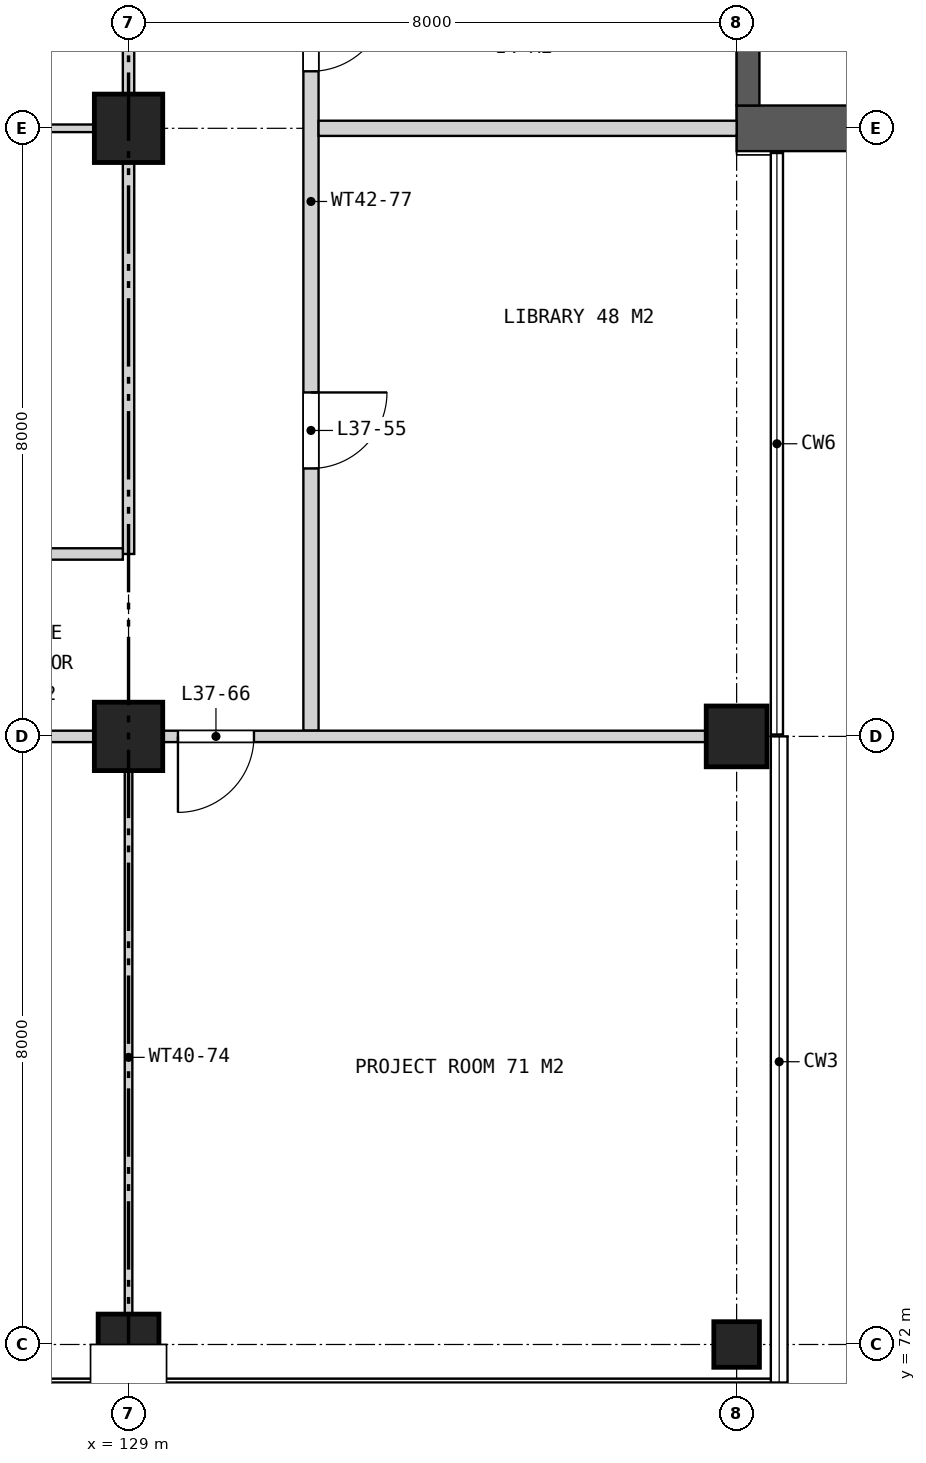
"""IFC4 building model, lengths in metres.
Left out: names, types, materials, properties, quantities, classifications, styles, units other than length and angle.
Written with IfcOpenShell. Run it as: python <this file> out.ifc"""

import sys

from ifc_helpers import new_model, si_unit, direction, frame, frame_2d, origin, origin_2d, place, context, subcontext, project, spatial, rectangle, extrude, element, fill, save


model = new_model("IFC4")
c1 = context("Model", 3, precision=1e-05, world=origin(), true_north=direction((0.0, 1.0)))
c2 = subcontext(c1, "Body", "Model", "MODEL_VIEW")
j1 = project(units=[si_unit("LENGTHUNIT", "METRE"), si_unit("PLANEANGLEUNIT", "RADIAN")], contexts=[c1])
p1 = place(None, origin())
s1 = spatial("IfcSite", under=j1, at=p1, CompositionType="ELEMENT")
p2 = place(p1, origin())
s2 = spatial("IfcBuilding", under=s1, at=p2, CompositionType="ELEMENT")
p3 = place(p2, frame((0.0, 0.0, 178.9)))
s3 = spatial("IfcBuildingStorey", under=s2, at=p3, CompositionType="ELEMENT", Elevation=178.9)
p4 = place(p3, frame((129.0, 72.0, 0.0), z_axis=(0.0, 0.0, 1.0), x_axis=(1.0, 0.0, 0.0)))
e1 = element("IfcColumn", 1, at=p4, inside=s3, PredefinedType="COLUMN", context=c2, shape_type="SweptSolid", body=[
    extrude(rectangle(XDim=0.8, YDim=0.8, at=origin_2d()), origin(), (0.0, 0.0, 1.0), 4.2),
])
for number, where, z_axis, x_axis in (
    (2, (129.0, 80.0, 0.0), (0.0, 0.0, 1.0), (1.0, 0.0, 0.0)),
    (3, (129.0, 88.0, 0.0), (0.0, 0.0, 1.0), (1.0, 0.0, 0.0)),
):
    element("IfcColumn", number, at=place(p3, frame(where, z_axis=z_axis, x_axis=x_axis)), inside=s3, PredefinedType="COLUMN", context=c2, shape_type="SweptSolid", body=[
        extrude(rectangle(XDim=0.9, YDim=0.9, at=origin_2d()), origin(), (0.0, 0.0, 1.0), 4.2),
    ])
p5 = place(p3, frame((137.0, 72.0, 0.0), z_axis=(0.0, 0.0, 1.0), x_axis=(1.0, 0.0, 0.0)))
e4 = element("IfcColumn", 4, at=p5, inside=s3, PredefinedType="COLUMN", context=c2, shape_type="SweptSolid", body=[
    extrude(rectangle(XDim=0.6, YDim=0.6, at=origin_2d()), origin(), (0.0, 0.0, 1.0), 4.2),
])
p6 = place(p3, frame((137.0, 80.0, 0.0), z_axis=(0.0, 0.0, 1.0), x_axis=(1.0, 0.0, 0.0)))
e5 = element("IfcColumn", 5, at=p6, inside=s3, PredefinedType="COLUMN", context=c2, shape_type="SweptSolid", body=[
    extrude(rectangle(XDim=0.8, YDim=0.8, at=origin_2d()), origin(), (0.0, 0.0, 1.0), 4.2),
])
p7 = place(p3, frame((137.0, 88.0, 0.0), z_axis=(0.0, 0.0, 1.0), x_axis=(1.0, 0.0, 0.0)))
e6 = element("IfcWall", 6, at=p7, inside=s3, PredefinedType="SHEAR", context=c2, shape_type="SweptSolid", body=[
    extrude(rectangle(XDim=7.1, YDim=0.6, at=frame_2d((3.55, 0.0))), origin(), (0.0, 0.0, 1.0), 4.2),
])
p8 = place(p3, frame((137.15, 88.3, 0.0), z_axis=(0.0, 0.0, 1.0), x_axis=(0.0, 1.0, 0.0)))
e7 = element("IfcWall", 7, at=p8, inside=s3, PredefinedType="SHEAR", context=c2, shape_type="SweptSolid", body=[
    extrude(rectangle(XDim=6.0, YDim=0.3, at=frame_2d((3.0, 0.0))), origin(), (0.0, 0.0, 1.0), 4.2),
])
p9 = place(p3, frame((129.0, 71.63, 0.0), z_axis=(0.0, 0.0, 1.0), x_axis=(0.0, 1.0, 0.0)))
e8 = element("IfcWall", 8, at=p9, inside=s3, PredefinedType="PARTITIONING", context=c2, shape_type="SweptSolid", body=[
    extrude(rectangle(XDim=8.295, YDim=0.1, at=frame_2d((4.147, 0.0))), origin(), (0.0, 0.0, 1.0), 3.44),
])
p10 = place(p3, frame((129.0, 82.4, 0.0), z_axis=(0.0, 0.0, 1.0), x_axis=(0.0, 1.0, 0.0)))
e9 = element("IfcWall", 9, at=p10, inside=s3, PredefinedType="PARTITIONING", context=c2, shape_type="SweptSolid", body=[
    extrude(rectangle(XDim=35.2, YDim=0.15, at=frame_2d((17.6, 0.0))), origin(), (0.0, 0.0, 1.0), 3.44),
])
p11 = place(p10, frame((14.35, 0.0, 0.0)))
e10 = element("IfcOpeningElement", 10, at=p11, cuts=e9, PredefinedType="OPENING", context=c2, shape_type="SweptSolid", body=[
    extrude(rectangle(XDim=1.0, YDim=2.1, at=frame_2d((0.5, 1.05))), frame((0.0, 0.085, 0.0), z_axis=(0.0, -1.0, 0.0), x_axis=(1.0, 0.0, 0.0)), (0.0, 0.0, 1.0), 0.17),
])
p12 = place(p10, frame((23.45, 0.0, 0.0)))
e11 = element("IfcOpeningElement", 11, at=p12, cuts=e9, PredefinedType="OPENING", context=c2, shape_type="SweptSolid", body=[
    extrude(rectangle(XDim=1.0, YDim=2.1, at=frame_2d((0.5, 1.05))), frame((0.0, 0.085, 0.0), z_axis=(0.0, -1.0, 0.0), x_axis=(1.0, 0.0, 0.0)), (0.0, 0.0, 1.0), 0.17),
])
p13 = place(p3, frame((131.4, 80.075, 0.0), z_axis=(0.0, 0.0, 1.0), x_axis=(0.0, 1.0, 0.0)))
e12 = element("IfcWall", 12, at=p13, inside=s3, PredefinedType="SOLIDWALL", context=c2, shape_type="SweptSolid", body=[
    extrude(rectangle(XDim=13.925, YDim=0.2, at=frame_2d((6.962, 0.0))), origin(), (0.0, 0.0, 1.0), 3.44),
])
p14 = place(p13, frame((11.675, 0.0, 0.0)))
e13 = element("IfcOpeningElement", 13, at=p14, cuts=e12, PredefinedType="OPENING", context=c2, shape_type="SweptSolid", body=[
    extrude(rectangle(XDim=1.0, YDim=2.1, at=frame_2d((0.5, 1.05))), frame((0.0, 0.11, 0.0), z_axis=(0.0, -1.0, 0.0), x_axis=(1.0, 0.0, 0.0)), (0.0, 0.0, 1.0), 0.22),
])
p15 = place(p13, frame((8.675, 0.0, 0.0)))
e14 = element("IfcOpeningElement", 14, at=p15, cuts=e12, PredefinedType="OPENING", context=c2, shape_type="SweptSolid", body=[
    extrude(rectangle(XDim=1.0, YDim=2.1, at=frame_2d((0.5, 1.05))), frame((0.0, 0.11, 0.0), z_axis=(0.0, -1.0, 0.0), x_axis=(1.0, 0.0, 0.0)), (0.0, 0.0, 1.0), 0.22),
])
p16 = place(p13, frame((3.45, 0.0, 0.0)))
e15 = element("IfcOpeningElement", 15, at=p16, cuts=e12, PredefinedType="OPENING", context=c2, shape_type="SweptSolid", body=[
    extrude(rectangle(XDim=1.0, YDim=2.1, at=frame_2d((0.5, 1.05))), frame((0.0, 0.11, 0.0), z_axis=(0.0, -1.0, 0.0), x_axis=(1.0, 0.0, 0.0)), (0.0, 0.0, 1.0), 0.22),
])
p17 = place(p3, frame((112.63, 80.0, 0.0), z_axis=(0.0, 0.0, 1.0), x_axis=(1.0, 0.0, 0.0)))
e16 = element("IfcWall", 16, at=p17, inside=s3, PredefinedType="PARTITIONING", context=c2, shape_type="SweptSolid", body=[
    extrude(rectangle(XDim=24.74, YDim=0.15, at=frame_2d((12.37, 0.0))), origin(), (0.0, 0.0, 1.0), 3.44),
])
p18 = place(p17, frame((11.42, 0.0, 0.0)))
e17 = element("IfcOpeningElement", 17, at=p18, cuts=e16, PredefinedType="OPENING", context=c2, shape_type="SweptSolid", body=[
    extrude(rectangle(XDim=1.8, YDim=2.1, at=frame_2d((0.9, 1.05))), frame((0.0, 0.085, 0.0), z_axis=(0.0, -1.0, 0.0), x_axis=(1.0, 0.0, 0.0)), (0.0, 0.0, 1.0), 0.17),
])
p19 = place(p17, frame((17.02, 0.0, 0.0)))
e18 = element("IfcOpeningElement", 18, at=p19, cuts=e16, PredefinedType="OPENING", context=c2, shape_type="SweptSolid", body=[
    extrude(rectangle(XDim=1.0, YDim=2.1, at=frame_2d((0.5, 1.05))), frame((0.0, 0.085, 0.0), z_axis=(0.0, -1.0, 0.0), x_axis=(1.0, 0.0, 0.0)), (0.0, 0.0, 1.0), 0.17),
])
p20 = place(p3, frame((121.075, 82.4, 0.0), z_axis=(0.0, 0.0, 1.0), x_axis=(1.0, 0.0, 0.0)))
e19 = element("IfcWall", 19, at=p20, inside=s3, PredefinedType="PARTITIONING", context=c2, shape_type="SweptSolid", body=[
    extrude(rectangle(XDim=7.85, YDim=0.15, at=frame_2d((3.925, 0.0))), origin(), (0.0, 0.0, 1.0), 3.44),
])
p21 = place(p20, frame((1.45, 0.0, 0.0)))
e20 = element("IfcOpeningElement", 20, at=p21, cuts=e19, PredefinedType="OPENING", context=c2, shape_type="SweptSolid", body=[
    extrude(rectangle(XDim=1.0, YDim=2.1, at=frame_2d((0.5, 1.05))), frame((0.0, 0.085, 0.0), z_axis=(0.0, -1.0, 0.0), x_axis=(1.0, 0.0, 0.0)), (0.0, 0.0, 1.0), 0.17),
])
p22 = place(p20, frame((5.375, 0.0, 0.0)))
e21 = element("IfcOpeningElement", 21, at=p22, cuts=e19, PredefinedType="OPENING", context=c2, shape_type="SweptSolid", body=[
    extrude(rectangle(XDim=1.0, YDim=2.1, at=frame_2d((0.5, 1.05))), frame((0.0, 0.085, 0.0), z_axis=(0.0, -1.0, 0.0), x_axis=(1.0, 0.0, 0.0)), (0.0, 0.0, 1.0), 0.17),
])
p23 = place(p3, frame((121.075, 88.0, 0.0), z_axis=(0.0, 0.0, 1.0), x_axis=(1.0, 0.0, 0.0)))
e22 = element("IfcWall", 22, at=p23, inside=s3, PredefinedType="PARTITIONING", context=c2, shape_type="SweptSolid", body=[
    extrude(rectangle(XDim=7.85, YDim=0.1, at=frame_2d((3.925, 0.0))), origin(), (0.0, 0.0, 1.0), 3.44),
])
p24 = place(p3, frame((131.5, 88.0, 0.0), z_axis=(0.0, 0.0, 1.0), x_axis=(1.0, 0.0, 0.0)))
e23 = element("IfcWall", 23, at=p24, inside=s3, PredefinedType="SOLIDWALL", context=c2, shape_type="SweptSolid", body=[
    extrude(rectangle(XDim=5.5, YDim=0.2, at=frame_2d((2.75, 0.0))), origin(), (0.0, 0.0, 1.0), 3.44),
])
p25 = place(p15, frame((1.0, 0.0, 0.0), z_axis=(0.0, 0.0, 1.0), x_axis=(-1.0, 0.0, 0.0)))
e24 = element("IfcDoor", 24, at=p25, inside=s3, OperationType="SINGLE_SWING_LEFT", PredefinedType="DOOR", context=c2, shape_type="SweptSolid", body=[
    extrude(rectangle(XDim=1.0, YDim=2.1, at=frame_2d((0.5, 1.05))), frame((0.0, 0.025, 0.0), z_axis=(0.0, -1.0, 0.0), x_axis=(1.0, 0.0, 0.0)), (0.0, 0.0, 1.0), 0.05),
])
fill(e14, e24)
p26 = place(p16, frame((1.0, 0.0, 0.0), z_axis=(0.0, 0.0, 1.0), x_axis=(-1.0, 0.0, 0.0)))
e25 = element("IfcDoor", 25, at=p26, inside=s3, OperationType="SINGLE_SWING_LEFT", PredefinedType="DOOR", context=c2, shape_type="SweptSolid", body=[
    extrude(rectangle(XDim=1.0, YDim=2.1, at=frame_2d((0.5, 1.05))), frame((0.0, 0.025, 0.0), z_axis=(0.0, -1.0, 0.0), x_axis=(1.0, 0.0, 0.0)), (0.0, 0.0, 1.0), 0.05),
])
fill(e15, e25)
p27 = place(p19, frame((1.0, 0.0, 0.0), z_axis=(0.0, 0.0, 1.0), x_axis=(-1.0, 0.0, 0.0)))
e26 = element("IfcDoor", 26, at=p27, inside=s3, OperationType="SINGLE_SWING_RIGHT", PredefinedType="DOOR", context=c2, shape_type="SweptSolid", body=[
    extrude(rectangle(XDim=1.0, YDim=2.1, at=frame_2d((0.5, 1.05))), frame((0.0, 0.025, 0.0), z_axis=(0.0, -1.0, 0.0), x_axis=(1.0, 0.0, 0.0)), (0.0, 0.0, 1.0), 0.05),
])
fill(e18, e26)
save(model, sys.argv[1])
